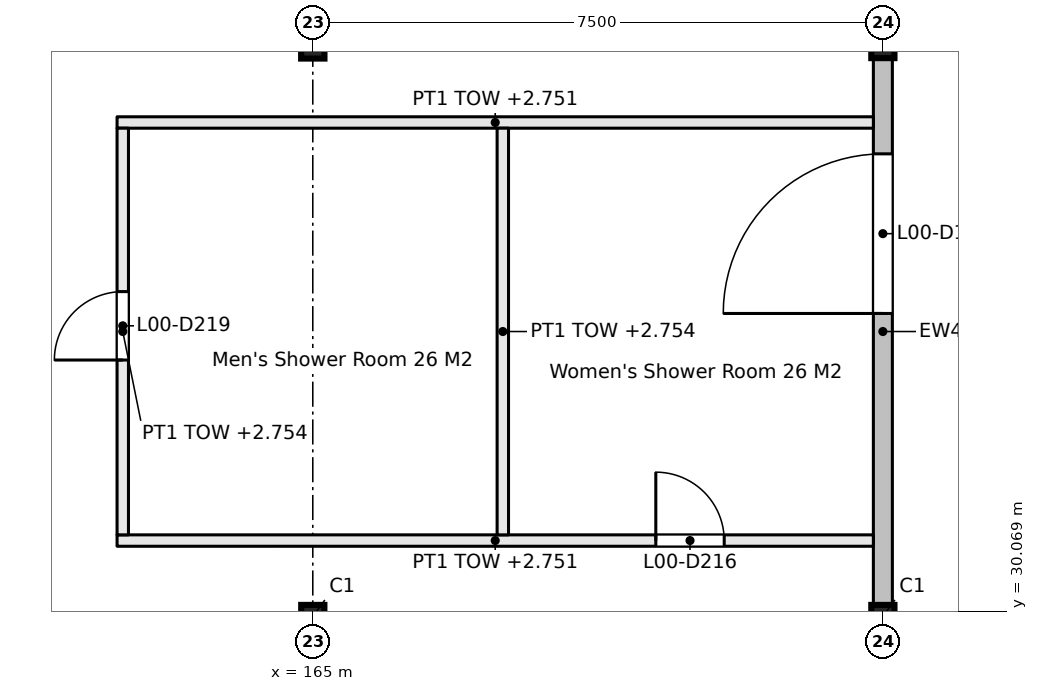
"""IFC4 building model, lengths in metres.
Left out: names, types, materials, properties, quantities, classifications, styles, units other than length and angle.
Written with IfcOpenShell. Run it as: python <this file> out.ifc"""

import sys

from ifc_helpers import new_model, si_unit, direction, frame, frame_2d, origin, origin_2d, place, context, subcontext, project, spatial, rectangle, i_section, extrude, element, fill, save


model = new_model("IFC4")
c1 = context("Model", 3, precision=1e-05, world=origin(), true_north=direction((0.0, 1.0)))
c2 = subcontext(c1, "Body", "Model", "MODEL_VIEW")
j1 = project(units=[si_unit("LENGTHUNIT", "METRE"), si_unit("PLANEANGLEUNIT", "RADIAN")], contexts=[c1])
p1 = place(None, origin())
s1 = spatial("IfcSite", under=j1, at=p1, CompositionType="ELEMENT")
p2 = place(p1, origin())
s2 = spatial("IfcBuilding", under=s1, at=p2, CompositionType="ELEMENT")
p3 = place(p2, origin())
s3 = spatial("IfcBuildingStorey", under=s2, at=p3, CompositionType="ELEMENT", Elevation=0.0)
p4 = place(p3, frame((165.0, 30.0, -0.25), z_axis=(0.0, 0.0, 1.0), x_axis=(1.0, 0.0, 0.0)))
e1 = element("IfcColumn", 1, at=p4, inside=s3, PredefinedType="COLUMN", context=c2, shape_type="SweptSolid", body=[
    extrude(i_section(OverallWidth=0.305, OverallDepth=0.307, WebThickness=0.01, FlangeThickness=0.015, FilletRadius=0.015, at=origin_2d()), origin(), (0.0, 0.0, 1.0), 3.55),
])
p5 = place(p3, frame((165.0, 37.5, -0.25), z_axis=(0.0, 0.0, 1.0), x_axis=(1.0, 0.0, 0.0)))
e2 = element("IfcColumn", 2, at=p5, inside=s3, PredefinedType="COLUMN", context=c2, shape_type="SweptSolid", body=[
    extrude(i_section(OverallWidth=0.307, OverallDepth=0.318, WebThickness=0.013, FlangeThickness=0.021, FilletRadius=0.015, at=origin_2d()), origin(), (0.0, 0.0, 1.0), 3.55),
])
for number, where, z_axis, x_axis in (
    (3, (172.5, 30.0, -0.25), (0.0, 0.0, 1.0), (1.0, 0.0, 0.0)),
    (4, (172.5, 37.5, -0.25), (0.0, 0.0, 1.0), (1.0, 0.0, 0.0)),
):
    element("IfcColumn", number, at=place(p3, frame(where, z_axis=z_axis, x_axis=x_axis)), inside=s3, PredefinedType="COLUMN", context=c2, shape_type="SweptSolid", body=[
        extrude(i_section(OverallWidth=0.305, OverallDepth=0.307, WebThickness=0.01, FlangeThickness=0.015, FilletRadius=0.015, at=origin_2d()), origin(), (0.0, 0.0, 1.0), 3.55),
    ])
p6 = place(p3, frame((162.425, 31.0, 0.0), z_axis=(0.0, 0.0, 1.0), x_axis=(1.0, 0.0, 0.0)))
e5 = element("IfcWall", 5, at=p6, inside=s3, PredefinedType="PARTITIONING", context=c2, shape_type="SweptSolid", body=[
    extrude(rectangle(XDim=9.95, YDim=0.15, at=frame_2d((4.975, 0.0))), origin(), (0.0, 0.0, 1.0), 2.751),
])
p7 = place(p6, frame((7.088, 0.0, 0.0)))
e6 = element("IfcOpeningElement", 6, at=p7, cuts=e5, PredefinedType="OPENING", context=c2, shape_type="SweptSolid", body=[
    extrude(rectangle(XDim=0.9, YDim=2.1, at=frame_2d((0.45, 1.05))), frame((0.0, 0.085, 0.0), z_axis=(0.0, -1.0, 0.0), x_axis=(1.0, 0.0, 0.0)), (0.0, 0.0, 1.0), 0.17),
])
p8 = place(p3, frame((162.425, 36.5, 0.0), z_axis=(0.0, 0.0, 1.0), x_axis=(1.0, 0.0, 0.0)))
e7 = element("IfcWall", 7, at=p8, inside=s3, PredefinedType="PARTITIONING", context=c2, shape_type="SweptSolid", body=[
    extrude(rectangle(XDim=9.95, YDim=0.15, at=frame_2d((4.975, 0.0))), origin(), (0.0, 0.0, 1.0), 2.751),
])
p9 = place(p3, frame((162.5, 31.075, 0.0), z_axis=(0.0, 0.0, 1.0), x_axis=(0.0, 1.0, 0.0)))
e8 = element("IfcWall", 8, at=p9, inside=s3, PredefinedType="PARTITIONING", context=c2, shape_type="SweptSolid", body=[
    extrude(rectangle(XDim=5.35, YDim=0.15, at=frame_2d((2.675, 0.0))), origin(), (0.0, 0.0, 1.0), 2.754),
])
p10 = place(p9, frame((2.3, 0.0, 0.0)))
e9 = element("IfcOpeningElement", 9, at=p10, cuts=e8, PredefinedType="OPENING", context=c2, shape_type="SweptSolid", body=[
    extrude(rectangle(XDim=0.9, YDim=2.1, at=frame_2d((0.45, 1.05))), frame((0.0, 0.085, 0.0), z_axis=(0.0, -1.0, 0.0), x_axis=(1.0, 0.0, 0.0)), (0.0, 0.0, 1.0), 0.17),
])
p11 = place(p3, frame((167.5, 31.075, 0.0), z_axis=(0.0, 0.0, 1.0), x_axis=(0.0, 1.0, 0.0)))
e10 = element("IfcWall", 10, at=p11, inside=s3, PredefinedType="PARTITIONING", context=c2, shape_type="SweptSolid", body=[
    extrude(rectangle(XDim=5.35, YDim=0.15, at=frame_2d((2.675, 0.0))), origin(), (0.0, 0.0, 1.0), 2.754),
])
p12 = place(p3, frame((172.5, 30.154, 0.0), z_axis=(0.0, 0.0, 1.0), x_axis=(0.0, 1.0, 0.0)))
e11 = element("IfcWall", 11, at=p12, inside=s3, PredefinedType="SOLIDWALL", context=c2, shape_type="SweptSolid", body=[
    extrude(rectangle(XDim=7.193, YDim=0.25, at=frame_2d((3.596, 0.0))), origin(), (0.0, 0.0, 1.0), 2.751),
])
p13 = place(p12, frame((3.834, 0.0, 0.0)))
e12 = element("IfcOpeningElement", 12, at=p13, cuts=e11, PredefinedType="OPENING", context=c2, shape_type="SweptSolid", body=[
    extrude(rectangle(XDim=2.1, YDim=2.4, at=frame_2d((1.05, 1.2))), frame((0.0, 0.135, 0.0), z_axis=(0.0, -1.0, 0.0), x_axis=(1.0, 0.0, 0.0)), (0.0, 0.0, 1.0), 0.27),
])
p14 = place(p7, origin())
e13 = element("IfcDoor", 13, at=p14, inside=s3, OperationType="SINGLE_SWING_RIGHT", PredefinedType="DOOR", context=c2, shape_type="SweptSolid", body=[
    extrude(rectangle(XDim=0.9, YDim=2.1, at=frame_2d((0.45, 1.05))), frame((0.0, 0.025, 0.0), z_axis=(0.0, -1.0, 0.0), x_axis=(1.0, 0.0, 0.0)), (0.0, 0.0, 1.0), 0.05),
])
fill(e6, e13)
p15 = place(p10, origin())
e14 = element("IfcDoor", 14, at=p15, inside=s3, OperationType="SINGLE_SWING_RIGHT", PredefinedType="DOOR", context=c2, shape_type="SweptSolid", body=[
    extrude(rectangle(XDim=0.9, YDim=2.1, at=frame_2d((0.45, 1.05))), frame((0.0, 0.025, 0.0), z_axis=(0.0, -1.0, 0.0), x_axis=(1.0, 0.0, 0.0)), (0.0, 0.0, 1.0), 0.05),
])
fill(e9, e14)
p16 = place(p13, origin())
e15 = element("IfcDoor", 15, at=p16, inside=s3, OperationType="DOUBLE_DOOR_SINGLE_SWING", PredefinedType="DOOR", context=c2, shape_type="SweptSolid", body=[
    extrude(rectangle(XDim=2.1, YDim=2.4, at=frame_2d((1.05, 1.2))), frame((0.0, 0.025, 0.0), z_axis=(0.0, -1.0, 0.0), x_axis=(1.0, 0.0, 0.0)), (0.0, 0.0, 1.0), 0.05),
])
fill(e12, e15)
save(model, sys.argv[1])
